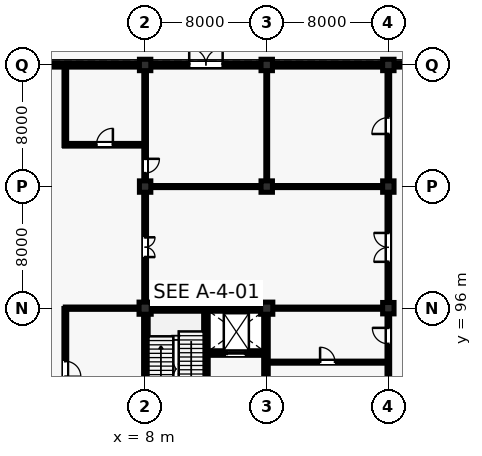
"""IFC4 building model, lengths in metres.
Left out: names, types, materials, properties, quantities, classifications, styles, units other than length and angle.
Written with IfcOpenShell. Run it as: python <this file> out.ifc"""

import sys

from ifc_helpers import new_model, si_unit, direction, frame, frame_2d, origin, origin_2d, place, context, subcontext, project, spatial, rectangle, extrude, element, fill, save


model = new_model("IFC4")
c1 = context("Model", 3, precision=1e-05, world=origin(), true_north=direction((0.0, 1.0)))
c2 = subcontext(c1, "Body", "Model", "MODEL_VIEW")
j1 = project(units=[si_unit("LENGTHUNIT", "METRE"), si_unit("PLANEANGLEUNIT", "RADIAN")], contexts=[c1])
p1 = place(None, origin())
s1 = spatial("IfcSite", under=j1, at=p1, CompositionType="ELEMENT")
p2 = place(p1, origin())
s2 = spatial("IfcBuilding", under=s1, at=p2, CompositionType="ELEMENT")
p3 = place(p2, origin())
s3 = spatial("IfcBuildingStorey", under=s2, at=p3, CompositionType="ELEMENT", Elevation=0.0)
p4 = place(p3, frame((8.0, 96.0, 0.0), z_axis=(0.0, 0.0, 1.0), x_axis=(1.0, 0.0, 0.0)))
e1 = element("IfcColumn", 1, at=p4, inside=s3, PredefinedType="COLUMN", context=c2, shape_type="SweptSolid", body=[
    extrude(rectangle(XDim=0.8, YDim=0.8, at=origin_2d()), origin(), (0.0, 0.0, 1.0), 5.28),
])
for number, where, z_axis, x_axis in (
    (2, (8.0, 104.0, 0.0), (0.0, 0.0, 1.0), (1.0, 0.0, 0.0)),
    (3, (8.0, 112.0, 0.0), (0.0, 0.0, 1.0), (1.0, 0.0, 0.0)),
):
    element("IfcColumn", number, at=place(p3, frame(where, z_axis=z_axis, x_axis=x_axis)), inside=s3, PredefinedType="COLUMN", context=c2, shape_type="SweptSolid", body=[
        extrude(rectangle(XDim=0.75, YDim=0.75, at=origin_2d()), origin(), (0.0, 0.0, 1.0), 5.28),
    ])
p5 = place(p3, frame((16.0, 96.0, 0.0), z_axis=(0.0, 0.0, 1.0), x_axis=(1.0, 0.0, 0.0)))
e4 = element("IfcColumn", 4, at=p5, inside=s3, PredefinedType="COLUMN", context=c2, shape_type="SweptSolid", body=[
    extrude(rectangle(XDim=0.8, YDim=0.8, at=origin_2d()), origin(), (0.0, 0.0, 1.0), 5.28),
])
for number, where, z_axis, x_axis in (
    (5, (16.0, 104.0, 0.0), (0.0, 0.0, 1.0), (1.0, 0.0, 0.0)),
    (6, (16.0, 112.0, 0.0), (0.0, 0.0, 1.0), (1.0, 0.0, 0.0)),
    (7, (24.0, 96.0, 0.0), (0.0, 0.0, 1.0), (1.0, 0.0, 0.0)),
    (8, (24.0, 104.0, 0.0), (0.0, 0.0, 1.0), (1.0, 0.0, 0.0)),
    (9, (24.0, 112.0, 0.0), (0.0, 0.0, 1.0), (1.0, 0.0, 0.0)),
):
    element("IfcColumn", number, at=place(p3, frame(where, z_axis=z_axis, x_axis=x_axis)), inside=s3, PredefinedType="COLUMN", context=c2, shape_type="SweptSolid", body=[
        extrude(rectangle(XDim=0.75, YDim=0.75, at=origin_2d()), origin(), (0.0, 0.0, 1.0), 5.28),
    ])
p6 = place(p3, frame((0.36, 112.0, 0.0), z_axis=(0.0, 0.0, 1.0), x_axis=(1.0, 0.0, 0.0)))
e10 = element("IfcWall", 10, at=p6, inside=s3, PredefinedType="SOLIDWALL", context=c2, shape_type="SweptSolid", body=[
    extrude(rectangle(XDim=7.28, YDim=0.28, at=frame_2d((3.64, 0.0))), origin(), (0.0, 0.0, 1.0), 4.614),
])
p7 = place(p6, frame((0.67, 0.0, 0.95)))
e11 = element("IfcOpeningElement", 11, at=p7, cuts=e10, PredefinedType="OPENING", context=c2, shape_type="SweptSolid", body=[
    extrude(rectangle(XDim=1.28, YDim=1.72, at=frame_2d((0.64, 0.86))), frame((0.0, 0.15, 0.0), z_axis=(0.0, -1.0, 0.0), x_axis=(1.0, 0.0, 0.0)), (0.0, 0.0, 1.0), 0.3),
])
p8 = place(p6, frame((5.33, 0.0, 0.95)))
e12 = element("IfcOpeningElement", 12, at=p8, cuts=e10, PredefinedType="OPENING", context=c2, shape_type="SweptSolid", body=[
    extrude(rectangle(XDim=1.28, YDim=1.72, at=frame_2d((0.64, 0.86))), frame((0.0, 0.15, 0.0), z_axis=(0.0, -1.0, 0.0), x_axis=(1.0, 0.0, 0.0)), (0.0, 0.0, 1.0), 0.3),
])
p9 = place(p3, frame((8.36, 112.0, 0.0), z_axis=(0.0, 0.0, 1.0), x_axis=(1.0, 0.0, 0.0)))
e13 = element("IfcWall", 13, at=p9, inside=s3, PredefinedType="SOLIDWALL", context=c2, shape_type="SweptSolid", body=[
    extrude(rectangle(XDim=7.28, YDim=0.28, at=frame_2d((3.64, 0.0))), origin(), (0.0, 0.0, 1.0), 4.677),
])
p10 = place(p9, frame((2.54, 0.0, 0.0)))
e14 = element("IfcOpeningElement", 14, at=p10, cuts=e13, PredefinedType="OPENING", context=c2, shape_type="SweptSolid", body=[
    extrude(rectangle(XDim=2.2, YDim=2.5, at=frame_2d((1.1, 1.25))), frame((0.0, 0.15, 0.0), z_axis=(0.0, -1.0, 0.0), x_axis=(1.0, 0.0, 0.0)), (0.0, 0.0, 1.0), 0.3),
])
p11 = place(p3, frame((16.36, 112.0, 0.0), z_axis=(0.0, 0.0, 1.0), x_axis=(1.0, 0.0, 0.0)))
e15 = element("IfcWall", 15, at=p11, inside=s3, PredefinedType="SOLIDWALL", context=c2, shape_type="SweptSolid", body=[
    extrude(rectangle(XDim=7.28, YDim=0.28, at=frame_2d((3.64, 0.0))), origin(), (0.0, 0.0, 1.0), 4.61),
])
p12 = place(p11, frame((2.49, 0.0, 0.9)))
e16 = element("IfcOpeningElement", 16, at=p12, cuts=e15, PredefinedType="OPENING", context=c2, shape_type="SweptSolid", body=[
    extrude(rectangle(XDim=2.3, YDim=2.55, at=frame_2d((1.15, 1.275))), frame((0.0, 0.15, 0.0), z_axis=(0.0, -1.0, 0.0), x_axis=(1.0, 0.0, 0.0)), (0.0, 0.0, 1.0), 0.3),
])
p13 = place(p3, frame((24.36, 112.0, 0.0), z_axis=(0.0, 0.0, 1.0), x_axis=(1.0, 0.0, 0.0)))
e17 = element("IfcWall", 17, at=p13, inside=s3, PredefinedType="SOLIDWALL", context=c2, shape_type="SweptSolid", body=[
    extrude(rectangle(XDim=7.28, YDim=0.28, at=frame_2d((3.64, 0.0))), origin(), (0.0, 0.0, 1.0), 4.674),
])
p14 = place(p13, frame((0.71, 0.0, 0.95)))
e18 = element("IfcOpeningElement", 18, at=p14, cuts=e17, PredefinedType="OPENING", context=c2, shape_type="SweptSolid", body=[
    extrude(rectangle(XDim=1.2, YDim=1.8, at=frame_2d((0.6, 0.9))), frame((0.0, 0.15, 0.0), z_axis=(0.0, -1.0, 0.0), x_axis=(1.0, 0.0, 0.0)), (0.0, 0.0, 1.0), 0.3),
])
p15 = place(p13, frame((5.37, 0.0, 0.95)))
e19 = element("IfcOpeningElement", 19, at=p15, cuts=e17, PredefinedType="OPENING", context=c2, shape_type="SweptSolid", body=[
    extrude(rectangle(XDim=1.2, YDim=1.8, at=frame_2d((0.6, 0.9))), frame((0.0, 0.15, 0.0), z_axis=(0.0, -1.0, 0.0), x_axis=(1.0, 0.0, 0.0)), (0.0, 0.0, 1.0), 0.3),
])
for number, where, z_axis, x_axis in (
    (20, (8.05, 88.29, 0.0), (0.0, 0.0, 1.0), (0.0, 1.0, 0.0)),
    (21, (8.29, 95.95, 0.0), (0.0, 0.0, 1.0), (1.0, 0.0, 0.0)),
    (22, (15.95, 88.29, 0.0), (0.0, 0.0, 1.0), (0.0, 1.0, 0.0)),
):
    element("IfcWall", number, at=place(p3, frame(where, z_axis=z_axis, x_axis=x_axis)), inside=s3, PredefinedType="SHEAR", context=c2, shape_type="SweptSolid", body=[
        extrude(rectangle(XDim=7.42, YDim=0.3, at=frame_2d((3.71, 0.0))), origin(), (0.0, 0.0, 1.0), 5.035),
    ])
p16 = place(p3, frame((12.0, 88.05, 0.0), z_axis=(0.0, 0.0, 1.0), x_axis=(0.0, 1.0, 0.0)))
e23 = element("IfcWall", 23, at=p16, inside=s3, PredefinedType="SHEAR", context=c2, shape_type="SweptSolid", body=[
    extrude(rectangle(XDim=7.9, YDim=0.3, at=frame_2d((3.95, 0.0))), origin(), (0.0, 0.0, 1.0), 5.035),
])
p17 = place(p16, frame((0.55, 0.0, 0.0)))
e24 = element("IfcOpeningElement", 24, at=p17, cuts=e23, PredefinedType="OPENING", context=c2, shape_type="SweptSolid", body=[
    extrude(rectangle(XDim=1.1, YDim=2.15, at=frame_2d((0.55, 1.075))), frame((0.0, 0.16, 0.0), z_axis=(0.0, -1.0, 0.0), x_axis=(1.0, 0.0, 0.0)), (0.0, 0.0, 1.0), 0.32),
])
p18 = place(p3, frame((12.0, 93.05, 0.0), z_axis=(0.0, 0.0, 1.0), x_axis=(1.0, 0.0, 0.0)))
e25 = element("IfcWall", 25, at=p18, inside=s3, PredefinedType="SHEAR", context=c2, shape_type="SweptSolid", body=[
    extrude(rectangle(XDim=3.95, YDim=0.3, at=frame_2d((1.975, 0.0))), origin(), (0.0, 0.0, 1.0), 5.035),
])
p19 = place(p18, frame((1.375, 0.0, 0.0)))
e26 = element("IfcOpeningElement", 26, at=p19, cuts=e25, PredefinedType="OPENING", context=c2, shape_type="SweptSolid", body=[
    extrude(rectangle(XDim=1.2, YDim=2.2, at=frame_2d((0.6, 1.1))), frame((0.0, 0.16, 0.0), z_axis=(0.0, -1.0, 0.0), x_axis=(1.0, 0.0, 0.0)), (0.0, 0.0, 1.0), 0.32),
])
p20 = place(p3, frame((2.75, 88.02, 0.0), z_axis=(0.0, 0.0, 1.0), x_axis=(0.0, 1.0, 0.0)))
e27 = element("IfcWall", 27, at=p20, inside=s3, PredefinedType="PARTITIONING", context=c2, shape_type="SweptSolid", body=[
    extrude(rectangle(XDim=7.96, YDim=0.185, at=frame_2d((3.98, 0.0))), origin(), (0.0, 0.0, 1.0), 4.327),
])
p21 = place(p20, frame((3.47, 0.0, 0.0)))
e28 = element("IfcOpeningElement", 28, at=p21, cuts=e27, PredefinedType="OPENING", context=c2, shape_type="SweptSolid", body=[
    extrude(rectangle(XDim=1.02, YDim=2.2, at=frame_2d((0.51, 1.1))), frame((0.0, 0.103, 0.0), z_axis=(0.0, -1.0, 0.0), x_axis=(1.0, 0.0, 0.0)), (0.0, 0.0, 1.0), 0.205),
])
p22 = place(p3, frame((2.75, 96.0, 0.0), z_axis=(0.0, 0.0, 1.0), x_axis=(1.0, 0.0, 0.0)))
e29 = element("IfcWall", 29, at=p22, inside=s3, PredefinedType="PARTITIONING", context=c2, shape_type="SweptSolid", body=[
    extrude(rectangle(XDim=4.84, YDim=0.15, at=frame_2d((2.42, 0.0))), origin(), (0.0, 0.0, 1.0), 4.327),
])
p23 = place(p3, frame((2.7, 106.75, 0.0), z_axis=(0.0, 0.0, 1.0), x_axis=(1.0, 0.0, 0.0)))
e30 = element("IfcWall", 30, at=p23, inside=s3, PredefinedType="PARTITIONING", context=c2, shape_type="SweptSolid", body=[
    extrude(rectangle(XDim=5.28, YDim=0.175, at=frame_2d((2.64, 0.0))), origin(), (0.0, 0.0, 1.0), 4.404),
])
p24 = place(p23, frame((2.1, 0.0, 0.0)))
e31 = element("IfcOpeningElement", 31, at=p24, cuts=e30, PredefinedType="OPENING", context=c2, shape_type="SweptSolid", body=[
    extrude(rectangle(XDim=1.08, YDim=2.2, at=frame_2d((0.54, 1.1))), frame((0.0, 0.097, 0.0), z_axis=(0.0, -1.0, 0.0), x_axis=(1.0, 0.0, 0.0)), (0.0, 0.0, 1.0), 0.195),
])
p25 = place(p3, frame((2.75, 106.7, 0.0), z_axis=(0.0, 0.0, 1.0), x_axis=(0.0, 1.0, 0.0)))
e32 = element("IfcWall", 32, at=p25, inside=s3, PredefinedType="PARTITIONING", context=c2, shape_type="SweptSolid", body=[
    extrude(rectangle(XDim=5.28, YDim=0.175, at=frame_2d((2.64, 0.0))), origin(), (0.0, 0.0, 1.0), 4.607),
])
p26 = place(p3, frame((8.0, 96.39, 0.0), z_axis=(0.0, 0.0, 1.0), x_axis=(0.0, 1.0, 0.0)))
e33 = element("IfcWall", 33, at=p26, inside=s3, PredefinedType="PARTITIONING", context=c2, shape_type="SweptSolid", body=[
    extrude(rectangle(XDim=7.245, YDim=0.185, at=frame_2d((3.623, 0.0))), origin(), (0.0, 0.0, 1.0), 4.412),
])
p27 = place(p26, frame((2.972, 0.0, 0.0)))
e34 = element("IfcOpeningElement", 34, at=p27, cuts=e33, PredefinedType="OPENING", context=c2, shape_type="SweptSolid", body=[
    extrude(rectangle(XDim=1.3, YDim=2.2, at=frame_2d((0.65, 1.1))), frame((0.0, 0.103, 0.0), z_axis=(0.0, -1.0, 0.0), x_axis=(1.0, 0.0, 0.0)), (0.0, 0.0, 1.0), 0.205),
])
p28 = place(p3, frame((8.0, 104.365, 0.0), z_axis=(0.0, 0.0, 1.0), x_axis=(0.0, 1.0, 0.0)))
e35 = element("IfcWall", 35, at=p28, inside=s3, PredefinedType="PARTITIONING", context=c2, shape_type="SweptSolid", body=[
    extrude(rectangle(XDim=7.27, YDim=0.175, at=frame_2d((3.635, 0.0))), origin(), (0.0, 0.0, 1.0), 4.404),
])
p29 = place(p28, frame((0.52, 0.0, 0.0)))
e36 = element("IfcOpeningElement", 36, at=p29, cuts=e35, PredefinedType="OPENING", context=c2, shape_type="SweptSolid", body=[
    extrude(rectangle(XDim=0.94, YDim=2.12, at=frame_2d((0.47, 1.06))), frame((0.0, 0.097, 0.0), z_axis=(0.0, -1.0, 0.0), x_axis=(1.0, 0.0, 0.0)), (0.0, 0.0, 1.0), 0.195),
])
p30 = place(p3, frame((8.365, 104.0, 0.0), z_axis=(0.0, 0.0, 1.0), x_axis=(1.0, 0.0, 0.0)))
e37 = element("IfcWall", 37, at=p30, inside=s3, PredefinedType="PARTITIONING", context=c2, shape_type="SweptSolid", body=[
    extrude(rectangle(XDim=7.27, YDim=0.135, at=frame_2d((3.635, 0.0))), origin(), (0.0, 0.0, 1.0), 4.336),
])
p31 = place(p3, frame((16.0, 104.365, 0.0), z_axis=(0.0, 0.0, 1.0), x_axis=(0.0, 1.0, 0.0)))
e38 = element("IfcWall", 38, at=p31, inside=s3, PredefinedType="PARTITIONING", context=c2, shape_type="SweptSolid", body=[
    extrude(rectangle(XDim=7.27, YDim=0.12, at=frame_2d((3.635, 0.0))), origin(), (0.0, 0.0, 1.0), 4.471),
])
p32 = place(p3, frame((24.0, 88.365, 0.0), z_axis=(0.0, 0.0, 1.0), x_axis=(0.0, 1.0, 0.0)))
e39 = element("IfcWall", 39, at=p32, inside=s3, PredefinedType="PARTITIONING", context=c2, shape_type="SweptSolid", body=[
    extrude(rectangle(XDim=7.27, YDim=0.175, at=frame_2d((3.635, 0.0))), origin(), (0.0, 0.0, 1.0), 4.404),
])
p33 = place(p32, frame((1.292, 0.0, 0.0)))
e40 = element("IfcOpeningElement", 40, at=p33, cuts=e39, PredefinedType="OPENING", context=c2, shape_type="SweptSolid", body=[
    extrude(rectangle(XDim=1.05, YDim=2.15, at=frame_2d((0.525, 1.075))), frame((0.0, 0.097, 0.0), z_axis=(0.0, -1.0, 0.0), x_axis=(1.0, 0.0, 0.0)), (0.0, 0.0, 1.0), 0.195),
])
p34 = place(p32, frame((5.291, 0.0, 0.0)))
e41 = element("IfcOpeningElement", 41, at=p34, cuts=e39, PredefinedType="OPENING", context=c2, shape_type="SweptSolid", body=[
    extrude(rectangle(XDim=1.05, YDim=2.15, at=frame_2d((0.525, 1.075))), frame((0.0, 0.097, 0.0), z_axis=(0.0, -1.0, 0.0), x_axis=(1.0, 0.0, 0.0)), (0.0, 0.0, 1.0), 0.195),
])
p35 = place(p3, frame((16.39, 96.0, 0.0), z_axis=(0.0, 0.0, 1.0), x_axis=(1.0, 0.0, 0.0)))
e42 = element("IfcWall", 42, at=p35, inside=s3, PredefinedType="PARTITIONING", context=c2, shape_type="SweptSolid", body=[
    extrude(rectangle(XDim=7.245, YDim=0.142, at=frame_2d((3.623, 0.0))), origin(), (0.0, 0.0, 1.0), 4.336),
])
p36 = place(p3, frame((24.0, 96.365, 0.0), z_axis=(0.0, 0.0, 1.0), x_axis=(0.0, 1.0, 0.0)))
e43 = element("IfcWall", 43, at=p36, inside=s3, PredefinedType="PARTITIONING", context=c2, shape_type="SweptSolid", body=[
    extrude(rectangle(XDim=7.27, YDim=0.175, at=frame_2d((3.635, 0.0))), origin(), (0.0, 0.0, 1.0), 4.471),
])
p37 = place(p36, frame((2.685, 0.0, 0.0)))
e44 = element("IfcOpeningElement", 44, at=p37, cuts=e43, PredefinedType="OPENING", context=c2, shape_type="SweptSolid", body=[
    extrude(rectangle(XDim=1.9, YDim=2.38, at=frame_2d((0.95, 1.19))), frame((0.0, 0.097, 0.0), z_axis=(0.0, -1.0, 0.0), x_axis=(1.0, 0.0, 0.0)), (0.0, 0.0, 1.0), 0.195),
])
p38 = place(p3, frame((16.365, 104.0, 0.0), z_axis=(0.0, 0.0, 1.0), x_axis=(1.0, 0.0, 0.0)))
e45 = element("IfcWall", 45, at=p38, inside=s3, PredefinedType="PARTITIONING", context=c2, shape_type="SweptSolid", body=[
    extrude(rectangle(XDim=7.27, YDim=0.135, at=frame_2d((3.635, 0.0))), origin(), (0.0, 0.0, 1.0), 4.404),
])
p39 = place(p3, frame((24.0, 104.365, 0.0), z_axis=(0.0, 0.0, 1.0), x_axis=(0.0, 1.0, 0.0)))
e46 = element("IfcWall", 46, at=p39, inside=s3, PredefinedType="PARTITIONING", context=c2, shape_type="SweptSolid", body=[
    extrude(rectangle(XDim=7.27, YDim=0.175, at=frame_2d((3.635, 0.0))), origin(), (0.0, 0.0, 1.0), 4.403),
])
p40 = place(p39, frame((3.095, 0.0, 0.0)))
e47 = element("IfcOpeningElement", 47, at=p40, cuts=e46, PredefinedType="OPENING", context=c2, shape_type="SweptSolid", body=[
    extrude(rectangle(XDim=1.08, YDim=2.2, at=frame_2d((0.54, 1.1))), frame((0.0, 0.097, 0.0), z_axis=(0.0, -1.0, 0.0), x_axis=(1.0, 0.0, 0.0)), (0.0, 0.0, 1.0), 0.195),
])
p41 = place(p3, frame((16.02, 92.45, 0.0), z_axis=(0.0, 0.0, 1.0), x_axis=(1.0, 0.0, 0.0)))
e48 = element("IfcWall", 48, at=p41, inside=s3, PredefinedType="PARTITIONING", context=c2, shape_type="SweptSolid", body=[
    extrude(rectangle(XDim=7.96, YDim=0.135, at=frame_2d((3.98, 0.0))), origin(), (0.0, 0.0, 1.0), 4.404),
])
p42 = place(p41, frame((3.49, 0.0, 0.0)))
e49 = element("IfcOpeningElement", 49, at=p42, cuts=e48, PredefinedType="OPENING", context=c2, shape_type="SweptSolid", body=[
    extrude(rectangle(XDim=0.98, YDim=2.15, at=frame_2d((0.49, 1.075))), frame((0.0, 0.077, 0.0), z_axis=(0.0, -1.0, 0.0), x_axis=(1.0, 0.0, 0.0)), (0.0, 0.0, 1.0), 0.155),
])
p43 = place(p7, origin())
e50 = element("IfcWindow", 50, at=p43, inside=s3, PartitioningType="SINGLE_PANEL", PredefinedType="WINDOW", context=c2, shape_type="SweptSolid", body=[
    extrude(rectangle(XDim=1.28, YDim=1.72, at=frame_2d((0.64, 0.86))), frame((0.0, 0.03, 0.0), z_axis=(0.0, -1.0, 0.0), x_axis=(1.0, 0.0, 0.0)), (0.0, 0.0, 1.0), 0.06),
])
fill(e11, e50)
p44 = place(p8, origin())
e51 = element("IfcWindow", 51, at=p44, inside=s3, PartitioningType="SINGLE_PANEL", PredefinedType="WINDOW", context=c2, shape_type="SweptSolid", body=[
    extrude(rectangle(XDim=1.28, YDim=1.72, at=frame_2d((0.64, 0.86))), frame((0.0, 0.03, 0.0), z_axis=(0.0, -1.0, 0.0), x_axis=(1.0, 0.0, 0.0)), (0.0, 0.0, 1.0), 0.06),
])
fill(e12, e51)
p45 = place(p10, origin())
e52 = element("IfcDoor", 52, at=p45, inside=s3, OperationType="DOUBLE_DOOR_SINGLE_SWING", PredefinedType="DOOR", context=c2, shape_type="SweptSolid", body=[
    extrude(rectangle(XDim=2.2, YDim=2.5, at=frame_2d((1.1, 1.25))), frame((0.0, 0.025, 0.0), z_axis=(0.0, -1.0, 0.0), x_axis=(1.0, 0.0, 0.0)), (0.0, 0.0, 1.0), 0.05),
])
fill(e14, e52)
p46 = place(p12, origin())
e53 = element("IfcWindow", 53, at=p46, inside=s3, PartitioningType="SINGLE_PANEL", PredefinedType="WINDOW", context=c2, shape_type="SweptSolid", body=[
    extrude(rectangle(XDim=2.3, YDim=2.55, at=frame_2d((1.15, 1.275))), frame((0.0, 0.03, 0.0), z_axis=(0.0, -1.0, 0.0), x_axis=(1.0, 0.0, 0.0)), (0.0, 0.0, 1.0), 0.06),
])
fill(e16, e53)
p47 = place(p19, origin())
e54 = element("IfcDoor", 54, at=p47, inside=s3, OperationType="SLIDING_TO_LEFT", PredefinedType="DOOR", context=c2, shape_type="SweptSolid", body=[
    extrude(rectangle(XDim=1.2, YDim=2.2, at=frame_2d((0.6, 1.1))), frame((0.0, 0.025, 0.0), z_axis=(0.0, -1.0, 0.0), x_axis=(1.0, 0.0, 0.0)), (0.0, 0.0, 1.0), 0.05),
])
fill(e26, e54)
p48 = place(p21, frame((1.02, 0.0, 0.0), z_axis=(0.0, 0.0, 1.0), x_axis=(-1.0, 0.0, 0.0)))
e55 = element("IfcDoor", 55, at=p48, inside=s3, OperationType="SINGLE_SWING_LEFT", PredefinedType="DOOR", context=c2, shape_type="SweptSolid", body=[
    extrude(rectangle(XDim=1.02, YDim=2.2, at=frame_2d((0.51, 1.1))), frame((0.0, 0.025, 0.0), z_axis=(0.0, -1.0, 0.0), x_axis=(1.0, 0.0, 0.0)), (0.0, 0.0, 1.0), 0.05),
])
fill(e28, e55)
p49 = place(p24, origin())
e56 = element("IfcDoor", 56, at=p49, inside=s3, OperationType="SINGLE_SWING_RIGHT", PredefinedType="DOOR", context=c2, shape_type="SweptSolid", body=[
    extrude(rectangle(XDim=1.08, YDim=2.2, at=frame_2d((0.54, 1.1))), frame((0.0, 0.025, 0.0), z_axis=(0.0, -1.0, 0.0), x_axis=(1.0, 0.0, 0.0)), (0.0, 0.0, 1.0), 0.05),
])
fill(e31, e56)
p50 = place(p27, frame((1.3, 0.0, 0.0), z_axis=(0.0, 0.0, 1.0), x_axis=(-1.0, 0.0, 0.0)))
e57 = element("IfcDoor", 57, at=p50, inside=s3, OperationType="DOUBLE_DOOR_SINGLE_SWING", PredefinedType="DOOR", context=c2, shape_type="SweptSolid", body=[
    extrude(rectangle(XDim=1.3, YDim=2.2, at=frame_2d((0.65, 1.1))), frame((0.0, 0.025, 0.0), z_axis=(0.0, -1.0, 0.0), x_axis=(1.0, 0.0, 0.0)), (0.0, 0.0, 1.0), 0.05),
])
fill(e34, e57)
p51 = place(p29, frame((0.94, 0.0, 0.0), z_axis=(0.0, 0.0, 1.0), x_axis=(-1.0, 0.0, 0.0)))
e58 = element("IfcDoor", 58, at=p51, inside=s3, OperationType="SINGLE_SWING_RIGHT", PredefinedType="DOOR", context=c2, shape_type="SweptSolid", body=[
    extrude(rectangle(XDim=0.94, YDim=2.12, at=frame_2d((0.47, 1.06))), frame((0.0, 0.025, 0.0), z_axis=(0.0, -1.0, 0.0), x_axis=(1.0, 0.0, 0.0)), (0.0, 0.0, 1.0), 0.05),
])
fill(e36, e58)
p52 = place(p34, origin())
e59 = element("IfcDoor", 59, at=p52, inside=s3, OperationType="SINGLE_SWING_RIGHT", PredefinedType="DOOR", context=c2, shape_type="SweptSolid", body=[
    extrude(rectangle(XDim=1.05, YDim=2.15, at=frame_2d((0.525, 1.075))), frame((0.0, 0.025, 0.0), z_axis=(0.0, -1.0, 0.0), x_axis=(1.0, 0.0, 0.0)), (0.0, 0.0, 1.0), 0.05),
])
fill(e41, e59)
p53 = place(p37, origin())
e60 = element("IfcDoor", 60, at=p53, inside=s3, OperationType="DOUBLE_DOOR_SINGLE_SWING", PredefinedType="DOOR", context=c2, shape_type="SweptSolid", body=[
    extrude(rectangle(XDim=1.9, YDim=2.38, at=frame_2d((0.95, 1.19))), frame((0.0, 0.025, 0.0), z_axis=(0.0, -1.0, 0.0), x_axis=(1.0, 0.0, 0.0)), (0.0, 0.0, 1.0), 0.05),
])
fill(e44, e60)
p54 = place(p40, origin())
e61 = element("IfcDoor", 61, at=p54, inside=s3, OperationType="SINGLE_SWING_LEFT", PredefinedType="DOOR", context=c2, shape_type="SweptSolid", body=[
    extrude(rectangle(XDim=1.08, YDim=2.2, at=frame_2d((0.54, 1.1))), frame((0.0, 0.025, 0.0), z_axis=(0.0, -1.0, 0.0), x_axis=(1.0, 0.0, 0.0)), (0.0, 0.0, 1.0), 0.05),
])
fill(e47, e61)
p55 = place(p42, origin())
e62 = element("IfcDoor", 62, at=p55, inside=s3, OperationType="SINGLE_SWING_LEFT", PredefinedType="DOOR", context=c2, shape_type="SweptSolid", body=[
    extrude(rectangle(XDim=0.98, YDim=2.15, at=frame_2d((0.49, 1.075))), frame((0.0, 0.025, 0.0), z_axis=(0.0, -1.0, 0.0), x_axis=(1.0, 0.0, 0.0)), (0.0, 0.0, 1.0), 0.05),
])
fill(e49, e62)
save(model, sys.argv[1])
